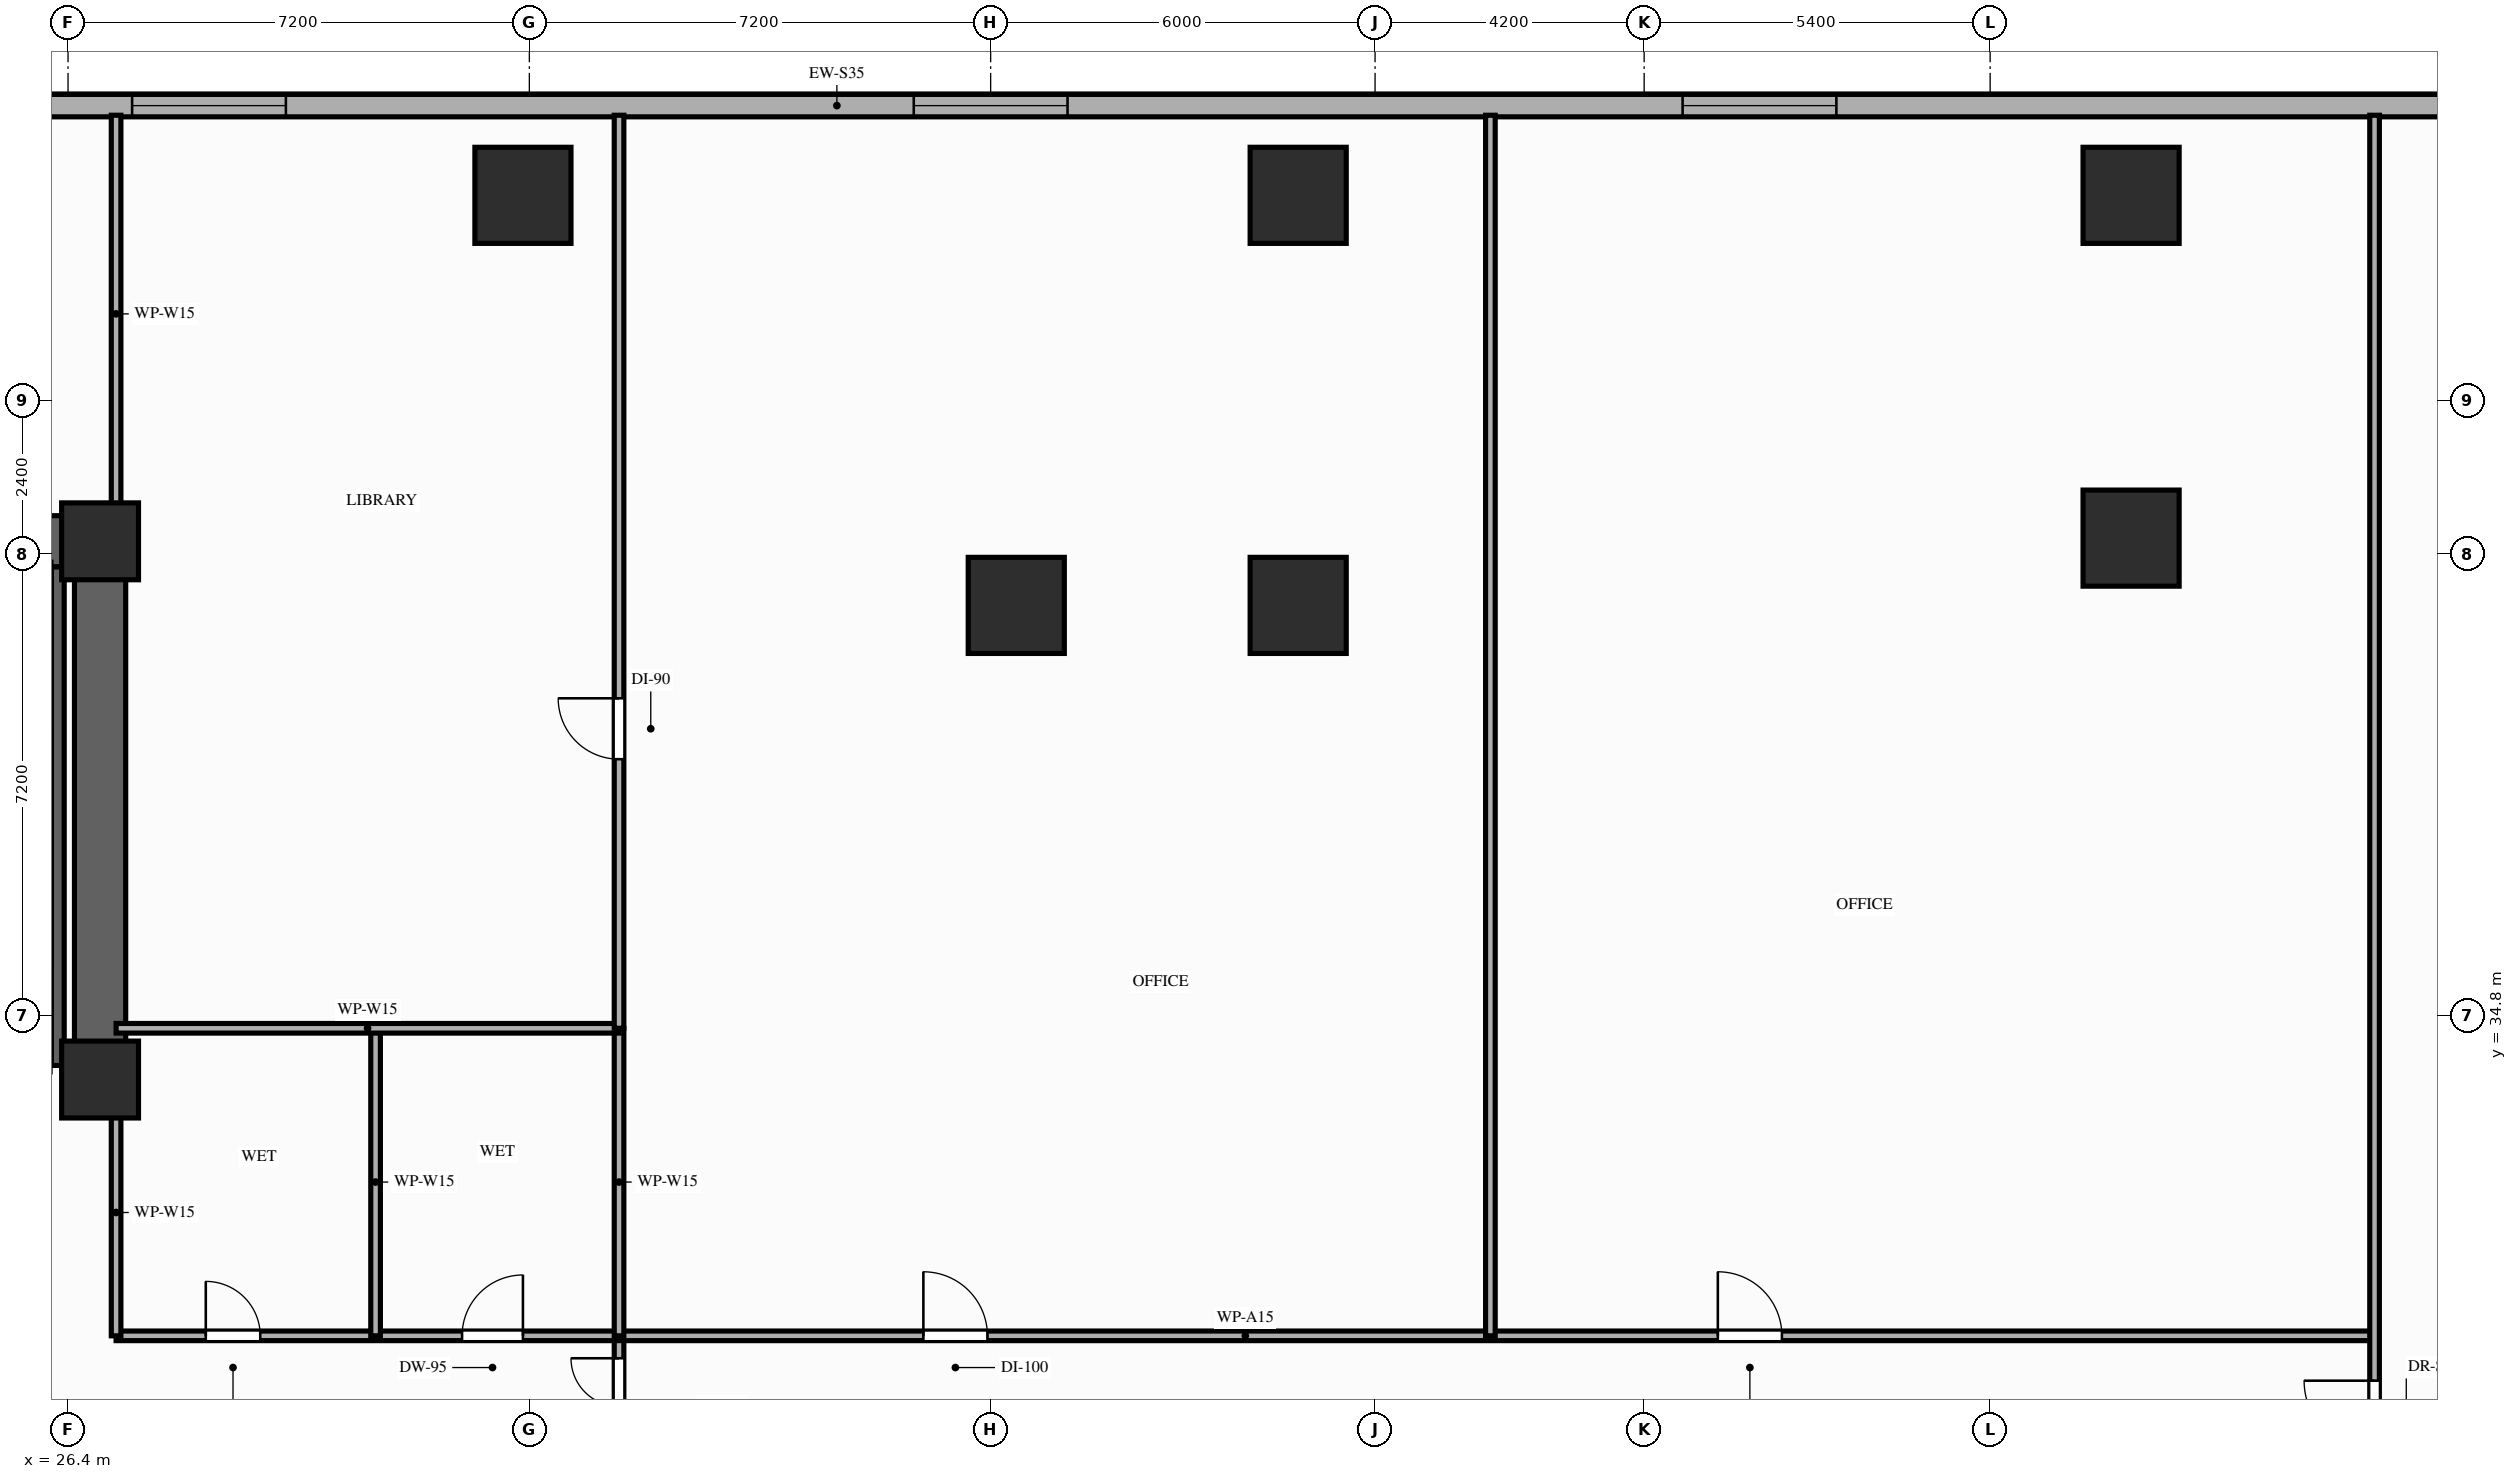
"""IFC4 building model, lengths in metres.
Left out: names, types, materials, properties, quantities, classifications, styles, units other than length and angle.
Written with IfcOpenShell. Run it as: python <this file> out.ifc"""

import sys

from ifc_helpers import new_model, si_unit, direction, frame, frame_2d, origin, origin_2d, place, context, subcontext, project, spatial, rectangle, extrude, element, fill, save


model = new_model("IFC4")
c1 = context("Model", 3, precision=1e-05, world=origin(), true_north=direction((0.0, 1.0)))
c2 = subcontext(c1, "Body", "Model", "MODEL_VIEW")
j1 = project(units=[si_unit("LENGTHUNIT", "METRE"), si_unit("PLANEANGLEUNIT", "RADIAN")], contexts=[c1])
p1 = place(None, origin())
s1 = spatial("IfcSite", under=j1, at=p1, CompositionType="ELEMENT")
p2 = place(p1, origin())
s2 = spatial("IfcBuilding", under=s1, at=p2, CompositionType="ELEMENT")
p3 = place(p2, frame((0.0, 0.0, 13.0)))
s3 = spatial("IfcBuildingStorey", under=s2, at=p3, CompositionType="ELEMENT", Elevation=13.0)
for number, where, z_axis, x_axis in (
    (1, (26.9, 33.8, 0.0), (0.0, 0.0, 1.0), (1.0, 0.0, 0.0)),
    (2, (26.9, 42.2, 0.0), (0.0, 0.0, 1.0), (1.0, 0.0, 0.0)),
):
    element("IfcColumn", number, at=place(p3, frame(where, z_axis=z_axis, x_axis=x_axis)), inside=s3, PredefinedType="COLUMN", context=c2, shape_type="SweptSolid", body=[
        extrude(rectangle(XDim=1.2, YDim=1.2, at=origin_2d()), origin(), (0.0, 0.0, 1.0), 4.6),
    ])
for number, where, z_axis, x_axis in (
    (3, (41.2, 41.2, 0.0), (0.0, 0.0, 1.0), (1.0, 0.0, 0.0)),
    (4, (45.6, 41.2, 0.0), (0.0, 0.0, 1.0), (1.0, 0.0, 0.0)),
    (5, (58.6, 42.25, 0.0), (0.0, 0.0, 1.0), (1.0, 0.0, 0.0)),
    (6, (33.5, 47.6, 0.0), (0.0, 0.0, 1.0), (1.0, 0.0, 0.0)),
    (7, (45.6, 47.6, 0.0), (0.0, 0.0, 1.0), (1.0, 0.0, 0.0)),
    (8, (58.6, 47.6, 0.0), (0.0, 0.0, 1.0), (1.0, 0.0, 0.0)),
):
    element("IfcColumn", number, at=place(p3, frame(where, z_axis=z_axis, x_axis=x_axis)), inside=s3, PredefinedType="COLUMN", context=c2, shape_type="SweptSolid", body=[
        extrude(rectangle(XDim=1.5, YDim=1.5, at=origin_2d()), origin(), (0.0, 0.0, 1.0), 4.6),
    ])
p4 = place(p3, frame((73.2, 49.0, 0.0), z_axis=(0.0, 0.0, 1.0), x_axis=(-1.0, 0.0, 0.0)))
e9 = element("IfcWall", 9, at=p4, inside=s3, PredefinedType="STANDARD", context=c2, shape_type="SweptSolid", body=[
    extrude(rectangle(XDim=69.6, YDim=0.35, at=frame_2d((34.8, 0.0))), origin(), (0.0, 0.0, 1.0), 4.35),
])
p5 = place(p4, frame((3.4, 0.0, 0.9)))
e10 = element("IfcOpeningElement", 10, at=p5, cuts=e9, PredefinedType="OPENING", context=c2, shape_type="SweptSolid", body=[
    extrude(rectangle(XDim=2.4, YDim=2.15, at=frame_2d((1.2, 1.075))), frame((0.0, 0.185, 0.0), z_axis=(0.0, -1.0, 0.0), x_axis=(1.0, 0.0, 0.0)), (0.0, 0.0, 1.0), 0.37),
])
p6 = place(p4, frame((19.2, 0.0, 0.9)))
e11 = element("IfcOpeningElement", 11, at=p6, cuts=e9, PredefinedType="OPENING", context=c2, shape_type="SweptSolid", body=[
    extrude(rectangle(XDim=2.4, YDim=2.15, at=frame_2d((1.2, 1.075))), frame((0.0, 0.185, 0.0), z_axis=(0.0, -1.0, 0.0), x_axis=(1.0, 0.0, 0.0)), (0.0, 0.0, 1.0), 0.37),
])
p7 = place(p4, frame((31.2, 0.0, 0.9)))
e12 = element("IfcOpeningElement", 12, at=p7, cuts=e9, PredefinedType="OPENING", context=c2, shape_type="SweptSolid", body=[
    extrude(rectangle(XDim=2.4, YDim=2.15, at=frame_2d((1.2, 1.075))), frame((0.0, 0.185, 0.0), z_axis=(0.0, -1.0, 0.0), x_axis=(1.0, 0.0, 0.0)), (0.0, 0.0, 1.0), 0.37),
])
p8 = place(p4, frame((43.4, 0.0, 0.9)))
e13 = element("IfcOpeningElement", 13, at=p8, cuts=e9, PredefinedType="OPENING", context=c2, shape_type="SweptSolid", body=[
    extrude(rectangle(XDim=2.4, YDim=2.15, at=frame_2d((1.2, 1.075))), frame((0.0, 0.185, 0.0), z_axis=(0.0, -1.0, 0.0), x_axis=(1.0, 0.0, 0.0)), (0.0, 0.0, 1.0), 0.37),
])
p9 = place(p4, frame((55.6, 0.0, 0.9)))
e14 = element("IfcOpeningElement", 14, at=p9, cuts=e9, PredefinedType="OPENING", context=c2, shape_type="SweptSolid", body=[
    extrude(rectangle(XDim=2.4, YDim=2.15, at=frame_2d((1.2, 1.075))), frame((0.0, 0.185, 0.0), z_axis=(0.0, -1.0, 0.0), x_axis=(1.0, 0.0, 0.0)), (0.0, 0.0, 1.0), 0.37),
])
p10 = place(p3, frame((6.45, 42.2, 0.0), z_axis=(0.0, 0.0, 1.0), x_axis=(1.0, 0.0, 0.0)))
e15 = element("IfcWall", 15, at=p10, inside=s3, PredefinedType="SHEAR", context=c2, shape_type="SweptSolid", body=[
    extrude(rectangle(XDim=20.45, YDim=0.8, at=frame_2d((10.225, 0.0))), origin(), (0.0, 0.0, 1.0), 4.35),
])
p11 = place(p3, frame((26.9, 33.8, 0.0), z_axis=(0.0, 0.0, 1.0), x_axis=(0.0, 1.0, 0.0)))
e16 = element("IfcWall", 16, at=p11, inside=s3, PredefinedType="SHEAR", context=c2, shape_type="SweptSolid", body=[
    extrude(rectangle(XDim=7.95, YDim=0.8, at=frame_2d((3.975, 0.0))), origin(), (0.0, 0.0, 1.0), 4.35),
])
p12 = place(p3, frame((26.24, 34.02, 0.0), z_axis=(0.0, 0.0, 1.0), x_axis=(0.0, 1.0, 0.0)))
e17 = element("IfcWall", 17, at=p12, inside=s3, PredefinedType="SHEAR", context=c2, shape_type="SweptSolid", body=[
    extrude(rectangle(XDim=7.78, YDim=0.2, at=frame_2d((3.89, 0.0))), origin(), (0.0, 0.0, 1.0), 4.35),
])
p13 = place(p3, frame((35.0, 27.6, 0.0), z_axis=(0.0, 0.0, 1.0), x_axis=(0.0, 1.0, 0.0)))
e18 = element("IfcWall", 18, at=p13, inside=s3, PredefinedType="PARTITIONING", context=c2, shape_type="SweptSolid", body=[
    extrude(rectangle(XDim=2.2, YDim=0.15, at=frame_2d((1.1, 0.0))), origin(), (0.0, 0.0, 1.0), 3.63),
])
p14 = place(p13, frame((0.35, 0.0, 0.0)))
e19 = element("IfcOpeningElement", 19, at=p14, cuts=e18, PredefinedType="OPENING", context=c2, shape_type="SweptSolid", body=[
    extrude(rectangle(XDim=1.5, YDim=2.18, at=frame_2d((0.75, 1.09))), frame((0.0, 0.085, 0.0), z_axis=(0.0, -1.0, 0.0), x_axis=(1.0, 0.0, 0.0)), (0.0, 0.0, 1.0), 0.17),
])
p15 = place(p3, frame((27.15, 29.8, 0.0), z_axis=(0.0, 0.0, 1.0), x_axis=(1.0, 0.0, 0.0)))
e20 = element("IfcWall", 20, at=p15, inside=s3, PredefinedType="PARTITIONING", context=c2, shape_type="SweptSolid", body=[
    extrude(rectangle(XDim=35.25, YDim=0.15, at=frame_2d((17.625, 0.0))), origin(), (0.0, 0.0, 1.0), 3.63),
])
p16 = place(p15, frame((25.0, 0.0, 0.0)))
e21 = element("IfcOpeningElement", 21, at=p16, cuts=e20, PredefinedType="OPENING", context=c2, shape_type="SweptSolid", body=[
    extrude(rectangle(XDim=1.0, YDim=2.15, at=frame_2d((0.5, 1.075))), frame((0.0, 0.085, 0.0), z_axis=(0.0, -1.0, 0.0), x_axis=(1.0, 0.0, 0.0)), (0.0, 0.0, 1.0), 0.17),
])
p17 = place(p15, frame((1.4, 0.0, 0.0)))
e22 = element("IfcOpeningElement", 22, at=p17, cuts=e20, PredefinedType="OPENING", context=c2, shape_type="SweptSolid", body=[
    extrude(rectangle(XDim=0.85, YDim=2.1, at=frame_2d((0.425, 1.05))), frame((0.0, 0.085, 0.0), z_axis=(0.0, -1.0, 0.0), x_axis=(1.0, 0.0, 0.0)), (0.0, 0.0, 1.0), 0.17),
])
p18 = place(p15, frame((5.4, 0.0, 0.0)))
e23 = element("IfcOpeningElement", 23, at=p18, cuts=e20, PredefinedType="OPENING", context=c2, shape_type="SweptSolid", body=[
    extrude(rectangle(XDim=0.95, YDim=2.1, at=frame_2d((0.475, 1.05))), frame((0.0, 0.085, 0.0), z_axis=(0.0, -1.0, 0.0), x_axis=(1.0, 0.0, 0.0)), (0.0, 0.0, 1.0), 0.17),
])
p19 = place(p15, frame((12.6, 0.0, 0.0)))
e24 = element("IfcOpeningElement", 24, at=p19, cuts=e20, PredefinedType="OPENING", context=c2, shape_type="SweptSolid", body=[
    extrude(rectangle(XDim=1.0, YDim=2.15, at=frame_2d((0.5, 1.075))), frame((0.0, 0.085, 0.0), z_axis=(0.0, -1.0, 0.0), x_axis=(1.0, 0.0, 0.0)), (0.0, 0.0, 1.0), 0.17),
])
p20 = place(p3, frame((27.15, 29.8, 0.0), z_axis=(0.0, 0.0, 1.0), x_axis=(0.0, 1.0, 0.0)))
e25 = element("IfcWall", 25, at=p20, inside=s3, PredefinedType="PARTITIONING", context=c2, shape_type="SweptSolid", body=[
    extrude(rectangle(XDim=3.85, YDim=0.15, at=frame_2d((1.925, 0.0))), origin(), (0.0, 0.0, 1.0), 3.63),
])
p21 = place(p3, frame((27.15, 42.65, 0.0), z_axis=(0.0, 0.0, 1.0), x_axis=(0.0, 1.0, 0.0)))
e26 = element("IfcWall", 26, at=p21, inside=s3, PredefinedType="PARTITIONING", context=c2, shape_type="SweptSolid", body=[
    extrude(rectangle(XDim=6.2, YDim=0.15, at=frame_2d((3.1, 0.0))), origin(), (0.0, 0.0, 1.0), 4.35),
])
for number, where, z_axis, x_axis in (
    (27, (31.2, 29.8, 0.0), (0.0, 0.0, 1.0), (0.0, 1.0, 0.0)),
    (28, (35.0, 29.8, 0.0), (0.0, 0.0, 1.0), (0.0, 1.0, 0.0)),
):
    element("IfcWall", number, at=place(p3, frame(where, z_axis=z_axis, x_axis=x_axis)), inside=s3, PredefinedType="PARTITIONING", context=c2, shape_type="SweptSolid", body=[
        extrude(rectangle(XDim=4.8, YDim=0.15, at=frame_2d((2.4, 0.0))), origin(), (0.0, 0.0, 1.0), 4.35),
    ])
p22 = place(p3, frame((27.15, 34.6, 0.0), z_axis=(0.0, 0.0, 1.0), x_axis=(1.0, 0.0, 0.0)))
e29 = element("IfcWall", 29, at=p22, inside=s3, PredefinedType="PARTITIONING", context=c2, shape_type="SweptSolid", body=[
    extrude(rectangle(XDim=7.85, YDim=0.15, at=frame_2d((3.925, 0.0))), origin(), (0.0, 0.0, 1.0), 3.63),
])
p23 = place(p3, frame((35.0, 34.6, 0.0), z_axis=(0.0, 0.0, 1.0), x_axis=(0.0, 1.0, 0.0)))
e30 = element("IfcWall", 30, at=p23, inside=s3, PredefinedType="PARTITIONING", context=c2, shape_type="SweptSolid", body=[
    extrude(rectangle(XDim=14.25, YDim=0.15, at=frame_2d((7.125, 0.0))), origin(), (0.0, 0.0, 1.0), 3.63),
])
p24 = place(p23, frame((4.2, 0.0, 0.0)))
e31 = element("IfcOpeningElement", 31, at=p24, cuts=e30, PredefinedType="OPENING", context=c2, shape_type="SweptSolid", body=[
    extrude(rectangle(XDim=0.95, YDim=2.15, at=frame_2d((0.475, 1.075))), frame((0.0, 0.085, 0.0), z_axis=(0.0, -1.0, 0.0), x_axis=(1.0, 0.0, 0.0)), (0.0, 0.0, 1.0), 0.17),
])
p25 = place(p3, frame((48.6, 29.8, 0.0), z_axis=(0.0, 0.0, 1.0), x_axis=(0.0, 1.0, 0.0)))
e32 = element("IfcWall", 32, at=p25, inside=s3, PredefinedType="PARTITIONING", context=c2, shape_type="SweptSolid", body=[
    extrude(rectangle(XDim=19.05, YDim=0.15, at=frame_2d((9.525, 0.0))), origin(), (0.0, 0.0, 1.0), 3.63),
])
p26 = place(p3, frame((62.4, 21.8, 0.0), z_axis=(0.0, 0.0, 1.0), x_axis=(0.0, 1.0, 0.0)))
e33 = element("IfcWall", 33, at=p26, inside=s3, PredefinedType="PARTITIONING", context=c2, shape_type="SweptSolid", body=[
    extrude(rectangle(XDim=27.05, YDim=0.15, at=frame_2d((13.525, 0.0))), origin(), (0.0, 0.0, 1.0), 3.63),
])
p27 = place(p26, frame((6.2, 0.0, 0.0)))
e34 = element("IfcOpeningElement", 34, at=p27, cuts=e33, PredefinedType="OPENING", context=c2, shape_type="SweptSolid", body=[
    extrude(rectangle(XDim=1.1, YDim=2.15, at=frame_2d((0.55, 1.075))), frame((0.0, 0.085, 0.0), z_axis=(0.0, -1.0, 0.0), x_axis=(1.0, 0.0, 0.0)), (0.0, 0.0, 1.0), 0.17),
])
p28 = place(p6, origin())
e35 = element("IfcWindow", 35, at=p28, inside=s3, PartitioningType="SINGLE_PANEL", PredefinedType="WINDOW", context=c2, shape_type="SweptSolid", body=[
    extrude(rectangle(XDim=2.4, YDim=2.15, at=frame_2d((1.2, 1.075))), frame((0.0, 0.03, 0.0), z_axis=(0.0, -1.0, 0.0), x_axis=(1.0, 0.0, 0.0)), (0.0, 0.0, 1.0), 0.06),
])
fill(e11, e35)
p29 = place(p7, origin())
e36 = element("IfcWindow", 36, at=p29, inside=s3, PartitioningType="SINGLE_PANEL", PredefinedType="WINDOW", context=c2, shape_type="SweptSolid", body=[
    extrude(rectangle(XDim=2.4, YDim=2.15, at=frame_2d((1.2, 1.075))), frame((0.0, 0.03, 0.0), z_axis=(0.0, -1.0, 0.0), x_axis=(1.0, 0.0, 0.0)), (0.0, 0.0, 1.0), 0.06),
])
fill(e12, e36)
p30 = place(p8, origin())
e37 = element("IfcWindow", 37, at=p30, inside=s3, PartitioningType="SINGLE_PANEL", PredefinedType="WINDOW", context=c2, shape_type="SweptSolid", body=[
    extrude(rectangle(XDim=2.4, YDim=2.15, at=frame_2d((1.2, 1.075))), frame((0.0, 0.03, 0.0), z_axis=(0.0, -1.0, 0.0), x_axis=(1.0, 0.0, 0.0)), (0.0, 0.0, 1.0), 0.06),
])
fill(e13, e37)
p31 = place(p16, origin())
e38 = element("IfcDoor", 38, at=p31, inside=s3, OperationType="SINGLE_SWING_LEFT", PredefinedType="DOOR", context=c2, shape_type="SweptSolid", body=[
    extrude(rectangle(XDim=1.0, YDim=2.15, at=frame_2d((0.5, 1.075))), frame((0.0, 0.025, 0.0), z_axis=(0.0, -1.0, 0.0), x_axis=(1.0, 0.0, 0.0)), (0.0, 0.0, 1.0), 0.05),
])
fill(e21, e38)
p32 = place(p14, origin())
e39 = element("IfcDoor", 39, at=p32, inside=s3, OperationType="DOUBLE_DOOR_SINGLE_SWING", PredefinedType="DOOR", context=c2, shape_type="SweptSolid", body=[
    extrude(rectangle(XDim=1.5, YDim=2.18, at=frame_2d((0.75, 1.09))), frame((0.0, 0.025, 0.0), z_axis=(0.0, -1.0, 0.0), x_axis=(1.0, 0.0, 0.0)), (0.0, 0.0, 1.0), 0.05),
])
fill(e19, e39)
p33 = place(p27, origin())
e40 = element("IfcDoor", 40, at=p33, inside=s3, OperationType="SINGLE_SWING_RIGHT", PredefinedType="DOOR", context=c2, shape_type="SweptSolid", body=[
    extrude(rectangle(XDim=1.1, YDim=2.15, at=frame_2d((0.55, 1.075))), frame((0.0, 0.025, 0.0), z_axis=(0.0, -1.0, 0.0), x_axis=(1.0, 0.0, 0.0)), (0.0, 0.0, 1.0), 0.05),
])
fill(e34, e40)
p34 = place(p17, origin())
e41 = element("IfcDoor", 41, at=p34, inside=s3, OperationType="SINGLE_SWING_LEFT", PredefinedType="DOOR", context=c2, shape_type="SweptSolid", body=[
    extrude(rectangle(XDim=0.85, YDim=2.1, at=frame_2d((0.425, 1.05))), frame((0.0, 0.025, 0.0), z_axis=(0.0, -1.0, 0.0), x_axis=(1.0, 0.0, 0.0)), (0.0, 0.0, 1.0), 0.05),
])
fill(e22, e41)
p35 = place(p18, origin())
e42 = element("IfcDoor", 42, at=p35, inside=s3, OperationType="SINGLE_SWING_RIGHT", PredefinedType="DOOR", context=c2, shape_type="SweptSolid", body=[
    extrude(rectangle(XDim=0.95, YDim=2.1, at=frame_2d((0.475, 1.05))), frame((0.0, 0.025, 0.0), z_axis=(0.0, -1.0, 0.0), x_axis=(1.0, 0.0, 0.0)), (0.0, 0.0, 1.0), 0.05),
])
fill(e23, e42)
p36 = place(p19, origin())
e43 = element("IfcDoor", 43, at=p36, inside=s3, OperationType="SINGLE_SWING_LEFT", PredefinedType="DOOR", context=c2, shape_type="SweptSolid", body=[
    extrude(rectangle(XDim=1.0, YDim=2.15, at=frame_2d((0.5, 1.075))), frame((0.0, 0.025, 0.0), z_axis=(0.0, -1.0, 0.0), x_axis=(1.0, 0.0, 0.0)), (0.0, 0.0, 1.0), 0.05),
])
fill(e24, e43)
p37 = place(p24, origin())
e44 = element("IfcDoor", 44, at=p37, inside=s3, OperationType="SINGLE_SWING_RIGHT", PredefinedType="DOOR", context=c2, shape_type="SweptSolid", body=[
    extrude(rectangle(XDim=0.95, YDim=2.15, at=frame_2d((0.475, 1.075))), frame((0.0, 0.025, 0.0), z_axis=(0.0, -1.0, 0.0), x_axis=(1.0, 0.0, 0.0)), (0.0, 0.0, 1.0), 0.05),
])
fill(e31, e44)
save(model, sys.argv[1])
